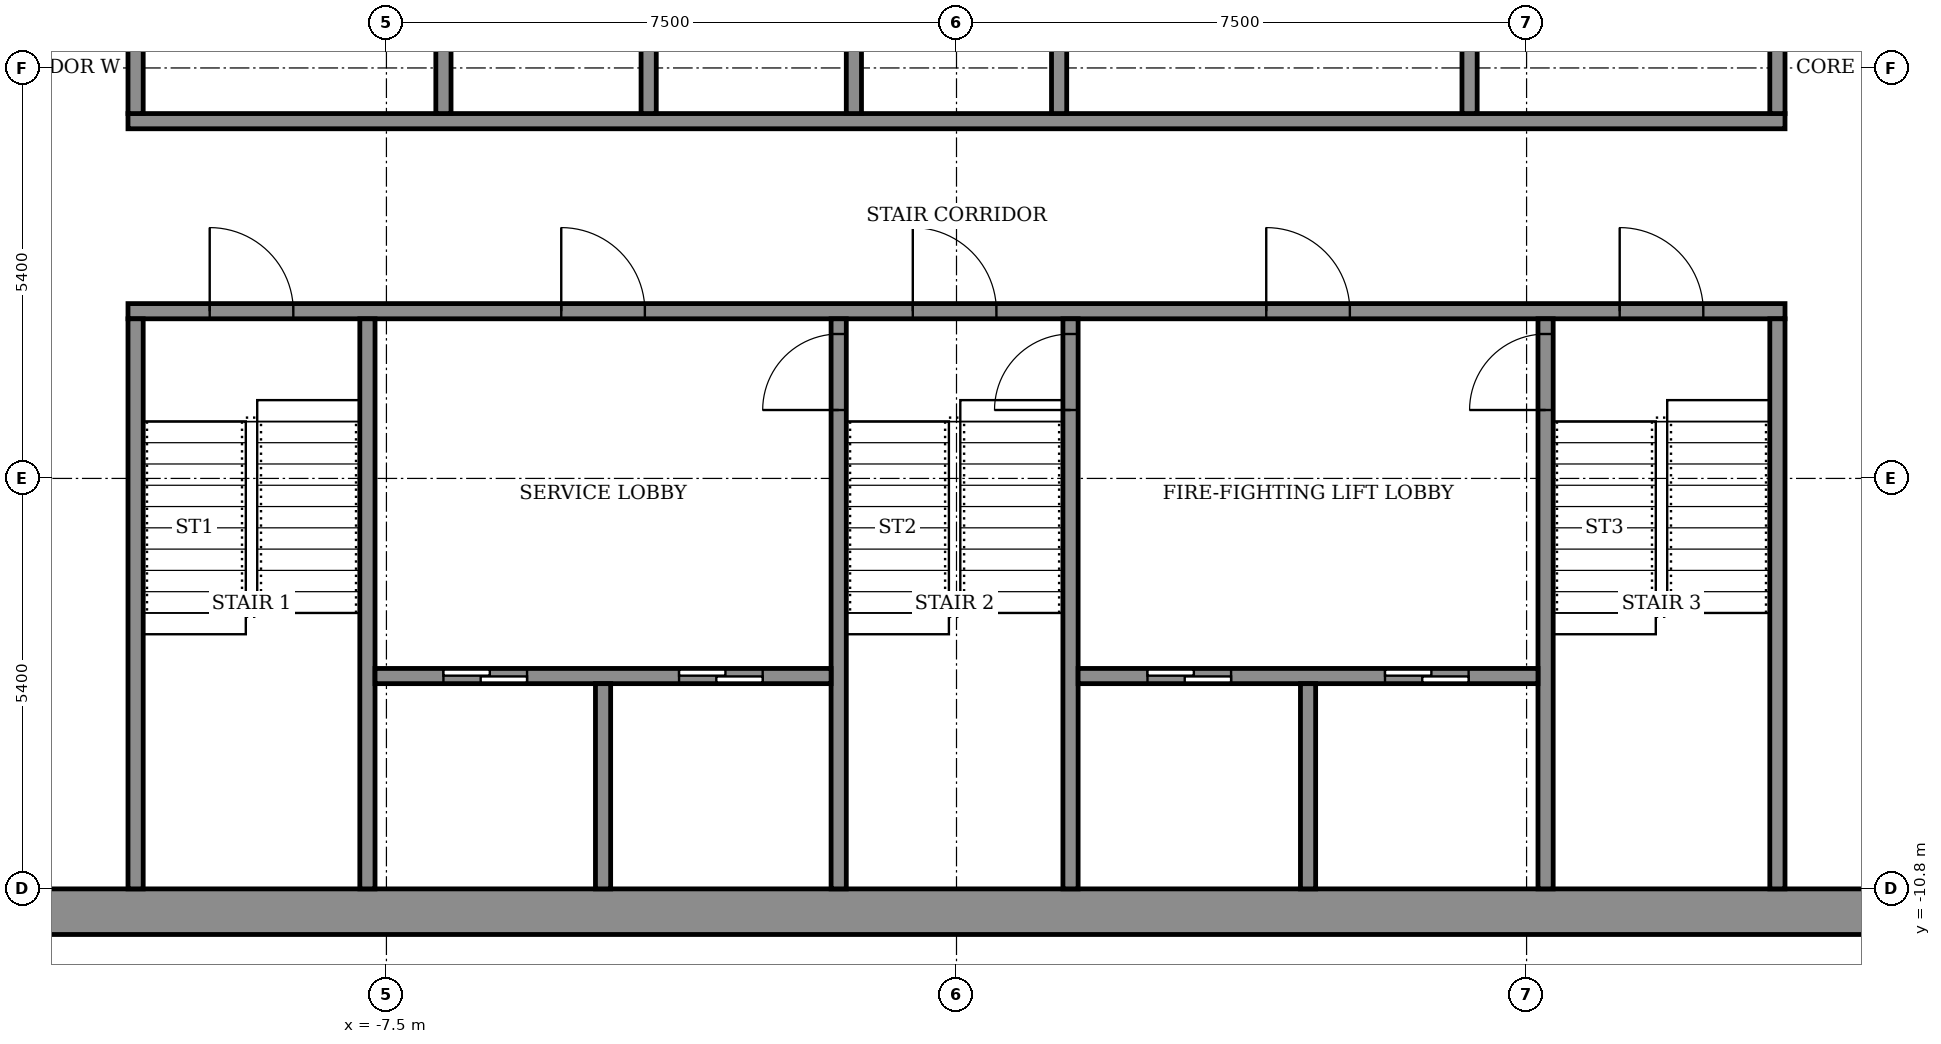
"""IFC4 building model, lengths in metres.
Left out: names, types, materials, properties, quantities, classifications, styles, units other than length and angle.
Written with IfcOpenShell. Run it as: python <this file> out.ifc"""

import sys

from ifc_helpers import new_model, si_unit, direction, frame, frame_2d, origin, place, context, subcontext, project, spatial, rectangle, extrude, element, fill, save


model = new_model("IFC4")
c1 = context("Model", 3, precision=1e-05, world=origin(), true_north=direction((0.0, 1.0)))
c2 = subcontext(c1, "Body", "Model", "MODEL_VIEW")
j1 = project(units=[si_unit("LENGTHUNIT", "METRE"), si_unit("PLANEANGLEUNIT", "RADIAN")], contexts=[c1])
p1 = place(None, origin())
s1 = spatial("IfcSite", under=j1, at=p1, CompositionType="ELEMENT")
p2 = place(p1, origin())
s2 = spatial("IfcBuilding", under=s1, at=p2, CompositionType="ELEMENT")
p3 = place(p2, frame((0.0, 0.0, 334.3)))
s3 = spatial("IfcBuildingStorey", under=s2, at=p3, CompositionType="ELEMENT", Elevation=334.3)
p4 = place(p3, frame((-14.4, -11.1, 0.0), z_axis=(0.0, 0.0, 1.0), x_axis=(1.0, 0.0, 0.0)))
e1 = element("IfcWall", 1, at=p4, inside=s3, PredefinedType="SHEAR", context=c2, shape_type="SweptSolid", body=[
    extrude(rectangle(XDim=28.8, YDim=0.6, at=frame_2d((14.4, 0.0))), origin(), (0.0, 0.0, 1.0), 3.6),
])
p5 = place(p3, frame((-10.9, -3.2, 0.0), z_axis=(0.0, 0.0, 1.0), x_axis=(1.0, 0.0, 0.0)))
e2 = element("IfcWall", 2, at=p5, inside=s3, PredefinedType="SHEAR", context=c2, shape_type="SweptSolid", body=[
    extrude(rectangle(XDim=21.8, YDim=0.2, at=frame_2d((10.9, 0.0))), origin(), (0.0, 0.0, 1.0), 3.05),
])
p6 = place(p5, frame((1.075, 0.0, 0.0)))
e3 = element("IfcOpeningElement", 3, at=p6, cuts=e2, PredefinedType="OPENING", context=c2, shape_type="SweptSolid", body=[
    extrude(rectangle(XDim=1.1, YDim=2.1, at=frame_2d((0.55, 1.05))), frame((0.0, 0.11, 0.0), z_axis=(0.0, -1.0, 0.0), x_axis=(1.0, 0.0, 0.0)), (0.0, 0.0, 1.0), 0.22),
])
p7 = place(p5, frame((10.325, 0.0, 0.0)))
e4 = element("IfcOpeningElement", 4, at=p7, cuts=e2, PredefinedType="OPENING", context=c2, shape_type="SweptSolid", body=[
    extrude(rectangle(XDim=1.1, YDim=2.1, at=frame_2d((0.55, 1.05))), frame((0.0, 0.11, 0.0), z_axis=(0.0, -1.0, 0.0), x_axis=(1.0, 0.0, 0.0)), (0.0, 0.0, 1.0), 0.22),
])
p8 = place(p5, frame((19.625, 0.0, 0.0)))
e5 = element("IfcOpeningElement", 5, at=p8, cuts=e2, PredefinedType="OPENING", context=c2, shape_type="SweptSolid", body=[
    extrude(rectangle(XDim=1.1, YDim=2.1, at=frame_2d((0.55, 1.05))), frame((0.0, 0.11, 0.0), z_axis=(0.0, -1.0, 0.0), x_axis=(1.0, 0.0, 0.0)), (0.0, 0.0, 1.0), 0.22),
])
p9 = place(p5, frame((5.7, 0.0, 0.0)))
e6 = element("IfcOpeningElement", 6, at=p9, cuts=e2, PredefinedType="OPENING", context=c2, shape_type="SweptSolid", body=[
    extrude(rectangle(XDim=1.1, YDim=2.1, at=frame_2d((0.55, 1.05))), frame((0.0, 0.11, 0.0), z_axis=(0.0, -1.0, 0.0), x_axis=(1.0, 0.0, 0.0)), (0.0, 0.0, 1.0), 0.22),
])
p10 = place(p5, frame((14.975, 0.0, 0.0)))
e7 = element("IfcOpeningElement", 7, at=p10, cuts=e2, PredefinedType="OPENING", context=c2, shape_type="SweptSolid", body=[
    extrude(rectangle(XDim=1.1, YDim=2.1, at=frame_2d((0.55, 1.05))), frame((0.0, 0.11, 0.0), z_axis=(0.0, -1.0, 0.0), x_axis=(1.0, 0.0, 0.0)), (0.0, 0.0, 1.0), 0.22),
])
p11 = place(p3, frame((-10.9, -0.7, 0.0), z_axis=(0.0, 0.0, 1.0), x_axis=(1.0, 0.0, 0.0)))
e8 = element("IfcWall", 8, at=p11, inside=s3, PredefinedType="SHEAR", context=c2, shape_type="SweptSolid", body=[
    extrude(rectangle(XDim=21.8, YDim=0.2, at=frame_2d((10.9, 0.0))), origin(), (0.0, 0.0, 1.0), 3.05),
])
for number, where, z_axis, x_axis in (
    (9, (-10.8, -10.8, 0.0), (0.0, 0.0, 1.0), (0.0, 1.0, 0.0)),
    (10, (-7.75, -10.8, 0.0), (0.0, 0.0, 1.0), (0.0, 1.0, 0.0)),
):
    element("IfcWall", number, at=place(p3, frame(where, z_axis=z_axis, x_axis=x_axis)), inside=s3, PredefinedType="SHEAR", context=c2, shape_type="SweptSolid", body=[
        extrude(rectangle(XDim=7.5, YDim=0.2, at=frame_2d((3.75, 0.0))), origin(), (0.0, 0.0, 1.0), 3.05),
    ])
p12 = place(p3, frame((-1.55, -10.8, 0.0), z_axis=(0.0, 0.0, 1.0), x_axis=(0.0, 1.0, 0.0)))
e11 = element("IfcWall", 11, at=p12, inside=s3, PredefinedType="SHEAR", context=c2, shape_type="SweptSolid", body=[
    extrude(rectangle(XDim=7.5, YDim=0.2, at=frame_2d((3.75, 0.0))), origin(), (0.0, 0.0, 1.0), 3.05),
])
p13 = place(p12, frame((6.3, 0.0, 0.0)))
e12 = element("IfcOpeningElement", 12, at=p13, cuts=e11, PredefinedType="OPENING", context=c2, shape_type="SweptSolid", body=[
    extrude(rectangle(XDim=1.0, YDim=2.1, at=frame_2d((0.5, 1.05))), frame((0.0, 0.11, 0.0), z_axis=(0.0, -1.0, 0.0), x_axis=(1.0, 0.0, 0.0)), (0.0, 0.0, 1.0), 0.22),
])
p14 = place(p3, frame((1.5, -10.8, 0.0), z_axis=(0.0, 0.0, 1.0), x_axis=(0.0, 1.0, 0.0)))
e13 = element("IfcWall", 13, at=p14, inside=s3, PredefinedType="SHEAR", context=c2, shape_type="SweptSolid", body=[
    extrude(rectangle(XDim=7.5, YDim=0.2, at=frame_2d((3.75, 0.0))), origin(), (0.0, 0.0, 1.0), 3.05),
])
p15 = place(p14, frame((6.3, 0.0, 0.0)))
e14 = element("IfcOpeningElement", 14, at=p15, cuts=e13, PredefinedType="OPENING", context=c2, shape_type="SweptSolid", body=[
    extrude(rectangle(XDim=1.0, YDim=2.1, at=frame_2d((0.5, 1.05))), frame((0.0, 0.11, 0.0), z_axis=(0.0, -1.0, 0.0), x_axis=(1.0, 0.0, 0.0)), (0.0, 0.0, 1.0), 0.22),
])
p16 = place(p3, frame((7.75, -10.8, 0.0), z_axis=(0.0, 0.0, 1.0), x_axis=(0.0, 1.0, 0.0)))
e15 = element("IfcWall", 15, at=p16, inside=s3, PredefinedType="SHEAR", context=c2, shape_type="SweptSolid", body=[
    extrude(rectangle(XDim=7.5, YDim=0.2, at=frame_2d((3.75, 0.0))), origin(), (0.0, 0.0, 1.0), 3.05),
])
p17 = place(p16, frame((6.3, 0.0, 0.0)))
e16 = element("IfcOpeningElement", 16, at=p17, cuts=e15, PredefinedType="OPENING", context=c2, shape_type="SweptSolid", body=[
    extrude(rectangle(XDim=1.0, YDim=2.1, at=frame_2d((0.5, 1.05))), frame((0.0, 0.11, 0.0), z_axis=(0.0, -1.0, 0.0), x_axis=(1.0, 0.0, 0.0)), (0.0, 0.0, 1.0), 0.22),
])
p18 = place(p3, frame((10.8, -10.8, 0.0), z_axis=(0.0, 0.0, 1.0), x_axis=(0.0, 1.0, 0.0)))
e17 = element("IfcWall", 17, at=p18, inside=s3, PredefinedType="SHEAR", context=c2, shape_type="SweptSolid", body=[
    extrude(rectangle(XDim=7.5, YDim=0.2, at=frame_2d((3.75, 0.0))), origin(), (0.0, 0.0, 1.0), 3.05),
])
p19 = place(p3, frame((-7.65, -8.0, 0.0), z_axis=(0.0, 0.0, 1.0), x_axis=(1.0, 0.0, 0.0)))
e18 = element("IfcWall", 18, at=p19, inside=s3, PredefinedType="SHEAR", context=c2, shape_type="SweptSolid", body=[
    extrude(rectangle(XDim=6.0, YDim=0.2, at=frame_2d((3.0, 0.0))), origin(), (0.0, 0.0, 1.0), 3.05),
])
p20 = place(p19, frame((0.9, 0.0, 0.0)))
e19 = element("IfcOpeningElement", 19, at=p20, cuts=e18, PredefinedType="OPENING", context=c2, shape_type="SweptSolid", body=[
    extrude(rectangle(XDim=1.1, YDim=2.1, at=frame_2d((0.55, 1.05))), frame((0.0, 0.11, 0.0), z_axis=(0.0, -1.0, 0.0), x_axis=(1.0, 0.0, 0.0)), (0.0, 0.0, 1.0), 0.22),
])
p21 = place(p19, frame((4.0, 0.0, 0.0)))
e20 = element("IfcOpeningElement", 20, at=p21, cuts=e18, PredefinedType="OPENING", context=c2, shape_type="SweptSolid", body=[
    extrude(rectangle(XDim=1.1, YDim=2.1, at=frame_2d((0.55, 1.05))), frame((0.0, 0.11, 0.0), z_axis=(0.0, -1.0, 0.0), x_axis=(1.0, 0.0, 0.0)), (0.0, 0.0, 1.0), 0.22),
])
p22 = place(p3, frame((-4.65, -10.8, 0.0), z_axis=(0.0, 0.0, 1.0), x_axis=(0.0, 1.0, 0.0)))
e21 = element("IfcWall", 21, at=p22, inside=s3, PredefinedType="SHEAR", context=c2, shape_type="SweptSolid", body=[
    extrude(rectangle(XDim=2.7, YDim=0.2, at=frame_2d((1.35, 0.0))), origin(), (0.0, 0.0, 1.0), 3.05),
])
p23 = place(p3, frame((1.6, -8.0, 0.0), z_axis=(0.0, 0.0, 1.0), x_axis=(1.0, 0.0, 0.0)))
e22 = element("IfcWall", 22, at=p23, inside=s3, PredefinedType="SHEAR", context=c2, shape_type="SweptSolid", body=[
    extrude(rectangle(XDim=6.05, YDim=0.2, at=frame_2d((3.025, 0.0))), origin(), (0.0, 0.0, 1.0), 3.05),
])
p24 = place(p23, frame((0.913, 0.0, 0.0)))
e23 = element("IfcOpeningElement", 23, at=p24, cuts=e22, PredefinedType="OPENING", context=c2, shape_type="SweptSolid", body=[
    extrude(rectangle(XDim=1.1, YDim=2.1, at=frame_2d((0.55, 1.05))), frame((0.0, 0.11, 0.0), z_axis=(0.0, -1.0, 0.0), x_axis=(1.0, 0.0, 0.0)), (0.0, 0.0, 1.0), 0.22),
])
p25 = place(p23, frame((4.038, 0.0, 0.0)))
e24 = element("IfcOpeningElement", 24, at=p25, cuts=e22, PredefinedType="OPENING", context=c2, shape_type="SweptSolid", body=[
    extrude(rectangle(XDim=1.1, YDim=2.1, at=frame_2d((0.55, 1.05))), frame((0.0, 0.11, 0.0), z_axis=(0.0, -1.0, 0.0), x_axis=(1.0, 0.0, 0.0)), (0.0, 0.0, 1.0), 0.22),
])
p26 = place(p3, frame((4.625, -10.8, 0.0), z_axis=(0.0, 0.0, 1.0), x_axis=(0.0, 1.0, 0.0)))
e25 = element("IfcWall", 25, at=p26, inside=s3, PredefinedType="SHEAR", context=c2, shape_type="SweptSolid", body=[
    extrude(rectangle(XDim=2.7, YDim=0.2, at=frame_2d((1.35, 0.0))), origin(), (0.0, 0.0, 1.0), 3.05),
])
p27 = place(p3, frame((-10.8, -0.6, 0.0), z_axis=(0.0, 0.0, 1.0), x_axis=(0.0, 1.0, 0.0)))
e26 = element("IfcWall", 26, at=p27, inside=s3, PredefinedType="STANDARD", context=c2, shape_type="SweptSolid", body=[
    extrude(rectangle(XDim=2.5, YDim=0.2, at=frame_2d((1.25, 0.0))), origin(), (0.0, 0.0, 1.0), 3.05),
])
for number, where, z_axis, x_axis in (
    (27, (-6.75, -0.6, 0.0), (0.0, 0.0, 1.0), (0.0, 1.0, 0.0)),
    (28, (-4.05, -0.6, 0.0), (0.0, 0.0, 1.0), (0.0, 1.0, 0.0)),
    (29, (-1.35, -0.6, 0.0), (0.0, 0.0, 1.0), (0.0, 1.0, 0.0)),
    (30, (1.35, -0.6, 0.0), (0.0, 0.0, 1.0), (0.0, 1.0, 0.0)),
):
    element("IfcWall", number, at=place(p3, frame(where, z_axis=z_axis, x_axis=x_axis)), inside=s3, PredefinedType="SHEAR", context=c2, shape_type="SweptSolid", body=[
        extrude(rectangle(XDim=2.5, YDim=0.2, at=frame_2d((1.25, 0.0))), origin(), (0.0, 0.0, 1.0), 3.05),
    ])
for number, where, z_axis, x_axis in (
    (31, (6.75, -0.6, 0.0), (0.0, 0.0, 1.0), (0.0, 1.0, 0.0)),
    (32, (10.8, -0.6, 0.0), (0.0, 0.0, 1.0), (0.0, 1.0, 0.0)),
):
    element("IfcWall", number, at=place(p3, frame(where, z_axis=z_axis, x_axis=x_axis)), inside=s3, PredefinedType="STANDARD", context=c2, shape_type="SweptSolid", body=[
        extrude(rectangle(XDim=2.5, YDim=0.2, at=frame_2d((1.25, 0.0))), origin(), (0.0, 0.0, 1.0), 3.05),
    ])
p28 = place(p24, origin())
e33 = element("IfcDoor", 33, at=p28, inside=s3, OperationType="SLIDING_TO_LEFT", PredefinedType="DOOR", context=c2, shape_type="SweptSolid", body=[
    extrude(rectangle(XDim=1.1, YDim=2.1, at=frame_2d((0.55, 1.05))), frame((0.0, 0.025, 0.0), z_axis=(0.0, -1.0, 0.0), x_axis=(1.0, 0.0, 0.0)), (0.0, 0.0, 1.0), 0.05),
])
fill(e23, e33)
p29 = place(p20, origin())
e34 = element("IfcDoor", 34, at=p29, inside=s3, OperationType="SLIDING_TO_LEFT", PredefinedType="DOOR", context=c2, shape_type="SweptSolid", body=[
    extrude(rectangle(XDim=1.1, YDim=2.1, at=frame_2d((0.55, 1.05))), frame((0.0, 0.025, 0.0), z_axis=(0.0, -1.0, 0.0), x_axis=(1.0, 0.0, 0.0)), (0.0, 0.0, 1.0), 0.05),
])
fill(e19, e34)
p30 = place(p25, origin())
e35 = element("IfcDoor", 35, at=p30, inside=s3, OperationType="SLIDING_TO_LEFT", PredefinedType="DOOR", context=c2, shape_type="SweptSolid", body=[
    extrude(rectangle(XDim=1.1, YDim=2.1, at=frame_2d((0.55, 1.05))), frame((0.0, 0.025, 0.0), z_axis=(0.0, -1.0, 0.0), x_axis=(1.0, 0.0, 0.0)), (0.0, 0.0, 1.0), 0.05),
])
fill(e24, e35)
p31 = place(p21, origin())
e36 = element("IfcDoor", 36, at=p31, inside=s3, OperationType="SLIDING_TO_LEFT", PredefinedType="DOOR", context=c2, shape_type="SweptSolid", body=[
    extrude(rectangle(XDim=1.1, YDim=2.1, at=frame_2d((0.55, 1.05))), frame((0.0, 0.025, 0.0), z_axis=(0.0, -1.0, 0.0), x_axis=(1.0, 0.0, 0.0)), (0.0, 0.0, 1.0), 0.05),
])
fill(e20, e36)
p32 = place(p6, origin())
e37 = element("IfcDoor", 37, at=p32, inside=s3, OperationType="SINGLE_SWING_RIGHT", PredefinedType="DOOR", context=c2, shape_type="SweptSolid", body=[
    extrude(rectangle(XDim=1.1, YDim=2.1, at=frame_2d((0.55, 1.05))), frame((0.0, 0.025, 0.0), z_axis=(0.0, -1.0, 0.0), x_axis=(1.0, 0.0, 0.0)), (0.0, 0.0, 1.0), 0.05),
])
fill(e3, e37)
p33 = place(p7, origin())
e38 = element("IfcDoor", 38, at=p33, inside=s3, OperationType="SINGLE_SWING_RIGHT", PredefinedType="DOOR", context=c2, shape_type="SweptSolid", body=[
    extrude(rectangle(XDim=1.1, YDim=2.1, at=frame_2d((0.55, 1.05))), frame((0.0, 0.025, 0.0), z_axis=(0.0, -1.0, 0.0), x_axis=(1.0, 0.0, 0.0)), (0.0, 0.0, 1.0), 0.05),
])
fill(e4, e38)
p34 = place(p8, origin())
e39 = element("IfcDoor", 39, at=p34, inside=s3, OperationType="SINGLE_SWING_RIGHT", PredefinedType="DOOR", context=c2, shape_type="SweptSolid", body=[
    extrude(rectangle(XDim=1.1, YDim=2.1, at=frame_2d((0.55, 1.05))), frame((0.0, 0.025, 0.0), z_axis=(0.0, -1.0, 0.0), x_axis=(1.0, 0.0, 0.0)), (0.0, 0.0, 1.0), 0.05),
])
fill(e5, e39)
p35 = place(p9, origin())
e40 = element("IfcDoor", 40, at=p35, inside=s3, OperationType="SINGLE_SWING_LEFT", PredefinedType="DOOR", context=c2, shape_type="SweptSolid", body=[
    extrude(rectangle(XDim=1.1, YDim=2.1, at=frame_2d((0.55, 1.05))), frame((0.0, 0.025, 0.0), z_axis=(0.0, -1.0, 0.0), x_axis=(1.0, 0.0, 0.0)), (0.0, 0.0, 1.0), 0.05),
])
fill(e6, e40)
p36 = place(p10, origin())
e41 = element("IfcDoor", 41, at=p36, inside=s3, OperationType="SINGLE_SWING_LEFT", PredefinedType="DOOR", context=c2, shape_type="SweptSolid", body=[
    extrude(rectangle(XDim=1.1, YDim=2.1, at=frame_2d((0.55, 1.05))), frame((0.0, 0.025, 0.0), z_axis=(0.0, -1.0, 0.0), x_axis=(1.0, 0.0, 0.0)), (0.0, 0.0, 1.0), 0.05),
])
fill(e7, e41)
p37 = place(p13, origin())
e42 = element("IfcDoor", 42, at=p37, inside=s3, OperationType="SINGLE_SWING_RIGHT", PredefinedType="DOOR", context=c2, shape_type="SweptSolid", body=[
    extrude(rectangle(XDim=1.0, YDim=2.1, at=frame_2d((0.5, 1.05))), frame((0.0, 0.025, 0.0), z_axis=(0.0, -1.0, 0.0), x_axis=(1.0, 0.0, 0.0)), (0.0, 0.0, 1.0), 0.05),
])
fill(e12, e42)
p38 = place(p15, origin())
e43 = element("IfcDoor", 43, at=p38, inside=s3, OperationType="SINGLE_SWING_RIGHT", PredefinedType="DOOR", context=c2, shape_type="SweptSolid", body=[
    extrude(rectangle(XDim=1.0, YDim=2.1, at=frame_2d((0.5, 1.05))), frame((0.0, 0.025, 0.0), z_axis=(0.0, -1.0, 0.0), x_axis=(1.0, 0.0, 0.0)), (0.0, 0.0, 1.0), 0.05),
])
fill(e14, e43)
p39 = place(p17, origin())
e44 = element("IfcDoor", 44, at=p39, inside=s3, OperationType="SINGLE_SWING_RIGHT", PredefinedType="DOOR", context=c2, shape_type="SweptSolid", body=[
    extrude(rectangle(XDim=1.0, YDim=2.1, at=frame_2d((0.5, 1.05))), frame((0.0, 0.025, 0.0), z_axis=(0.0, -1.0, 0.0), x_axis=(1.0, 0.0, 0.0)), (0.0, 0.0, 1.0), 0.05),
])
fill(e16, e44)
save(model, sys.argv[1])
